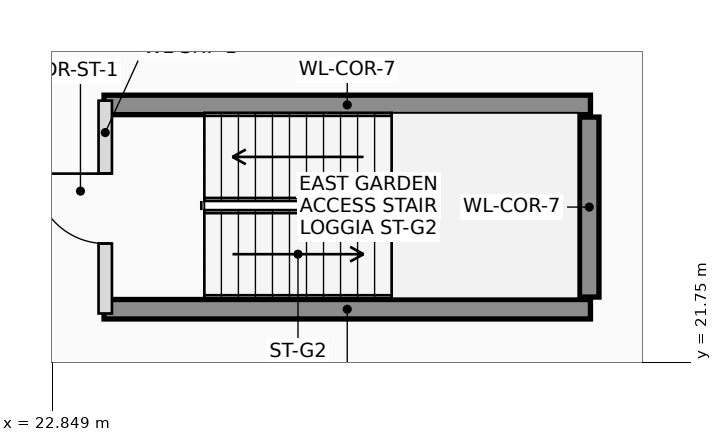
"""IFC4 building model, lengths in metres.
Left out: names, types, materials, properties, quantities, classifications, styles, units other than length and angle.
Written with IfcOpenShell. Run it as: python <this file> out.ifc"""

import sys

from ifc_helpers import new_model, si_unit, direction, frame, frame_2d, origin, place, context, subcontext, project, spatial, rectangle, extrude, element, fill, save


model = new_model("IFC4")
c1 = context("Model", 3, precision=1e-05, world=origin(), true_north=direction((0.0, 1.0)))
c2 = subcontext(c1, "Body", "Model", "MODEL_VIEW")
j1 = project(units=[si_unit("LENGTHUNIT", "METRE"), si_unit("PLANEANGLEUNIT", "RADIAN")], contexts=[c1])
p1 = place(None, origin())
s1 = spatial("IfcSite", under=j1, at=p1, CompositionType="ELEMENT")
p2 = place(p1, origin())
s2 = spatial("IfcBuilding", under=s1, at=p2, CompositionType="ELEMENT")
p3 = place(p2, frame((0.0, 0.0, 12.3)))
s3 = spatial("IfcBuildingStorey", under=s2, at=p3, CompositionType="ELEMENT", Elevation=12.3)
for number, where, z_axis, x_axis in (
    (1, (23.7, 25.98, 0.0), (0.0, 0.0, 1.0), (1.0, 0.0, 0.0)),
    (2, (23.7, 22.62, 0.0), (0.0, 0.0, 1.0), (1.0, 0.0, 0.0)),
):
    element("IfcWall", number, at=place(p3, frame(where, z_axis=z_axis, x_axis=x_axis)), inside=s3, PredefinedType="SHEAR", context=c2, shape_type="SweptSolid", body=[
        extrude(rectangle(XDim=8.0, YDim=0.32, at=frame_2d((4.0, 0.0))), origin(), (0.0, 0.0, 1.0), 3.9),
    ])
p4 = place(p3, frame((31.68, 22.82, 0.0), z_axis=(0.0, 0.0, 1.0), x_axis=(0.0, 1.0, 0.0)))
e3 = element("IfcWall", 3, at=p4, inside=s3, PredefinedType="SHEAR", context=c2, shape_type="SweptSolid", body=[
    extrude(rectangle(XDim=2.96, YDim=0.32, at=frame_2d((1.48, 0.0))), origin(), (0.0, 0.0, 1.0), 3.9),
])
p5 = place(p3, frame((23.72, 22.55, 0.0), z_axis=(0.0, 0.0, 1.0), x_axis=(0.0, 1.0, 0.0)))
e4 = element("IfcWall", 4, at=p5, inside=s3, PredefinedType="PLUMBINGWALL", context=c2, shape_type="SweptSolid", body=[
    extrude(rectangle(XDim=3.5, YDim=0.22, at=frame_2d((1.75, 0.0))), origin(), (0.0, 0.0, 1.0), 3.57),
])
p6 = place(p5, frame((1.15, 0.0, 0.0)))
e5 = element("IfcOpeningElement", 5, at=p6, cuts=e4, PredefinedType="OPENING", context=c2, shape_type="SweptSolid", body=[
    extrude(rectangle(XDim=1.15, YDim=2.15, at=frame_2d((0.575, 1.075))), frame((0.0, 0.12, 0.0), z_axis=(0.0, -1.0, 0.0), x_axis=(1.0, 0.0, 0.0)), (0.0, 0.0, 1.0), 0.24),
])
p7 = place(p6, origin())
e6 = element("IfcDoor", 6, at=p7, inside=s3, OperationType="SINGLE_SWING_RIGHT", PredefinedType="DOOR", context=c2, shape_type="SweptSolid", body=[
    extrude(rectangle(XDim=1.15, YDim=2.15, at=frame_2d((0.575, 1.075))), frame((0.0, 0.025, 0.0), z_axis=(0.0, -1.0, 0.0), x_axis=(1.0, 0.0, 0.0)), (0.0, 0.0, 1.0), 0.05),
])
fill(e5, e6)
save(model, sys.argv[1])
